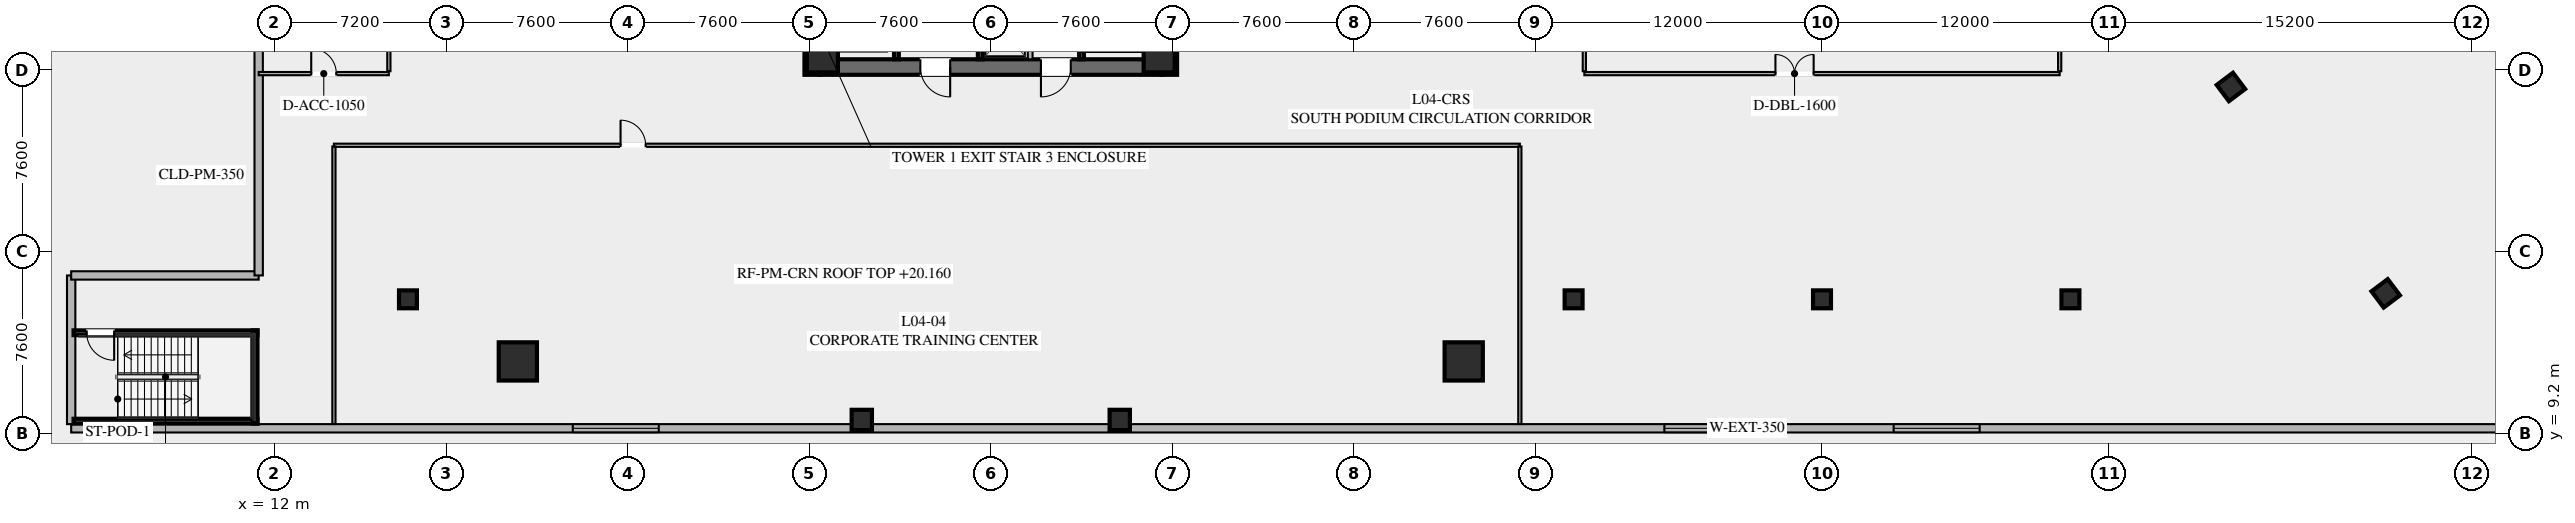
"""IFC4 building model, lengths in metres.
Left out: names, types, materials, properties, quantities, classifications, styles, units other than length and angle.
Written with IfcOpenShell. Run it as: python <this file> out.ifc"""

import sys

from ifc_helpers import new_model, si_unit, direction, frame, frame_2d, origin, origin_2d, place, context, subcontext, project, spatial, rectangle, hollow_rectangle, extrude, element, fill, save


model = new_model("IFC4")
c1 = context("Model", 3, precision=1e-05, world=origin(), true_north=direction((0.0, 1.0)))
c2 = subcontext(c1, "Body", "Model", "MODEL_VIEW")
j1 = project(units=[si_unit("LENGTHUNIT", "METRE"), si_unit("PLANEANGLEUNIT", "RADIAN")], contexts=[c1])
p1 = place(None, origin())
s1 = spatial("IfcSite", under=j1, at=p1, CompositionType="ELEMENT")
p2 = place(p1, origin())
s2 = spatial("IfcBuilding", under=s1, at=p2, CompositionType="ELEMENT")
p3 = place(p2, frame((0.0, 0.0, 19.8)))
s3 = spatial("IfcBuildingStorey", under=s2, at=p3, CompositionType="ELEMENT", Elevation=19.8)
for number, where, z_axis, x_axis in (
    (1, (34.525, 24.2, 0.0), (0.0, 0.0, 1.0), (0.0, 1.0, 0.0)),
    (2, (49.475, 39.8, 0.0), (0.0, 0.0, 1.0), (0.0, -1.0, 0.0)),
):
    element("IfcWall", number, at=place(p3, frame(where, z_axis=z_axis, x_axis=x_axis)), inside=s3, PredefinedType="SHEAR", context=c2, shape_type="SweptSolid", body=[
        extrude(rectangle(XDim=15.6, YDim=0.65, at=frame_2d((7.8, 0.0))), origin(), (0.0, 0.0, 1.0), 4.8),
    ])
p4 = place(p3, frame((49.15, 24.525, 0.0), z_axis=(0.0, 0.0, 1.0), x_axis=(-1.0, 0.0, 0.0)))
e3 = element("IfcWall", 3, at=p4, inside=s3, PredefinedType="SHEAR", context=c2, shape_type="SweptSolid", body=[
    extrude(rectangle(XDim=14.3, YDim=0.65, at=frame_2d((7.15, 0.0))), origin(), (0.0, 0.0, 1.0), 4.8),
])
p5 = place(p4, frame((8.85, 0.0, 0.0)))
e4 = element("IfcOpeningElement", 4, at=p5, cuts=e3, PredefinedType="OPENING", context=c2, shape_type="SweptSolid", body=[
    extrude(rectangle(XDim=1.25, YDim=2.25, at=frame_2d((0.625, 1.125))), frame((0.0, 0.335, 0.0), z_axis=(0.0, -1.0, 0.0), x_axis=(1.0, 0.0, 0.0)), (0.0, 0.0, 1.0), 0.67),
])
p6 = place(p4, frame((3.8, 0.0, 0.0)))
e5 = element("IfcOpeningElement", 5, at=p6, cuts=e3, PredefinedType="OPENING", context=c2, shape_type="SweptSolid", body=[
    extrude(rectangle(XDim=1.25, YDim=2.25, at=frame_2d((0.625, 1.125))), frame((0.0, 0.335, 0.0), z_axis=(0.0, -1.0, 0.0), x_axis=(1.0, 0.0, 0.0)), (0.0, 0.0, 1.0), 0.67),
])
for number, where, z_axis, x_axis in (
    (6, (34.95, 24.95, 0.0), (0.0, 0.0, 1.0), (1.0, 0.0, 0.0)),
    (7, (49.05, 24.95, 0.0), (0.0, 0.0, 1.0), (1.0, 0.0, 0.0)),
):
    element("IfcColumn", number, at=place(p3, frame(where, z_axis=z_axis, x_axis=x_axis)), inside=s3, PredefinedType="COLUMN", context=c2, shape_type="SweptSolid", body=[
        extrude(hollow_rectangle(XDim=1.3, YDim=1.3, WallThickness=0.05, at=origin_2d()), origin(), (0.0, 0.0, 1.0), 4.6),
    ])
for number, where, z_axis, x_axis in (
    (8, (22.2, 12.2, 0.0), (0.0, 0.0, 1.0), (1.0, 0.0, 0.0)),
    (9, (61.8, 12.2, 0.0), (0.0, 0.0, 1.0), (1.0, 0.0, 0.0)),
):
    element("IfcColumn", number, at=place(p3, frame(where, z_axis=z_axis, x_axis=x_axis)), inside=s3, PredefinedType="COLUMN", context=c2, shape_type="SweptSolid", body=[
        extrude(hollow_rectangle(XDim=1.6, YDim=1.6, WallThickness=0.06, at=origin_2d()), origin(), (0.0, 0.0, 1.0), 4.6),
    ])
for number, where, z_axis, x_axis in (
    (10, (36.6, 9.75, 0.0), (0.0, 0.0, 1.0), (1.0, 0.0, 0.0)),
    (11, (47.4, 9.75, 0.0), (0.0, 0.0, 1.0), (1.0, 0.0, 0.0)),
):
    element("IfcColumn", number, at=place(p3, frame(where, z_axis=z_axis, x_axis=x_axis)), inside=s3, PredefinedType="COLUMN", context=c2, shape_type="SweptSolid", body=[
        extrude(hollow_rectangle(XDim=0.85, YDim=0.85, WallThickness=0.035, at=origin_2d()), origin(), (0.0, 0.0, 1.0), 4.6),
    ])
p7 = place(p3, frame((112.476, 21.107, 0.0), z_axis=(0.0, 0.0, 1.0), x_axis=(-0.600005007985, 0.799996243986, 0.0)))
e12 = element("IfcWall", 12, at=p7, inside=s3, PredefinedType="SHEAR", context=c2, shape_type="SweptSolid", body=[
    extrude(rectangle(XDim=15.6, YDim=0.65, at=frame_2d((7.8, 0.0))), origin(), (0.0, 0.0, 1.0), 4.8),
])
for number, where, z_axis, x_axis in (
    (13, (93.92, 23.69, 0.0), (0.0, 0.0, 1.0), (0.8, 0.6, 0.0)),
    (14, (100.4, 15.05, 0.0), (0.0, 0.0, 1.0), (0.8, 0.6, 0.0)),
):
    element("IfcColumn", number, at=place(p3, frame(where, z_axis=z_axis, x_axis=x_axis)), inside=s3, PredefinedType="COLUMN", context=c2, shape_type="SweptSolid", body=[
        extrude(hollow_rectangle(XDim=0.85, YDim=0.85, WallThickness=0.035, at=origin_2d()), origin(), (0.0, 0.0, 1.0), 4.6),
    ])
for number, where, z_axis, x_axis in (
    (15, (17.6, 14.8, 0.0), (0.0, 0.0, 1.0), (1.0, 0.0, 0.0)),
    (16, (66.4, 14.8, 0.0), (0.0, 0.0, 1.0), (1.0, 0.0, 0.0)),
    (17, (76.8, 14.8, 0.0), (0.0, 0.0, 1.0), (1.0, 0.0, 0.0)),
    (18, (87.2, 14.8, 0.0), (0.0, 0.0, 1.0), (1.0, 0.0, 0.0)),
):
    element("IfcColumn", number, at=place(p3, frame(where, z_axis=z_axis, x_axis=x_axis)), inside=s3, PredefinedType="COLUMN", context=c2, shape_type="SweptSolid", body=[
        extrude(rectangle(XDim=0.75, YDim=0.75, at=origin_2d()), origin(), (0.0, 0.0, 1.0), 4.6),
    ])
p8 = place(p3, frame((143.825, 9.4, 0.0), z_axis=(0.0, 0.0, 1.0), x_axis=(-1.0, 0.0, 0.0)))
e19 = element("IfcWall", 19, at=p8, inside=s3, PredefinedType="SOLIDWALL", context=c2, shape_type="SweptSolid", body=[
    extrude(rectangle(XDim=140.325, YDim=0.35, at=frame_2d((70.163, 0.0))), origin(), (0.0, 0.0, 1.0), 4.6),
])
p9 = place(p8, frame((115.725, 0.0, 0.95)))
e20 = element("IfcOpeningElement", 20, at=p9, cuts=e19, PredefinedType="OPENING", context=c2, shape_type="SweptSolid", body=[
    extrude(rectangle(XDim=3.6, YDim=1.8, at=frame_2d((1.8, 0.9))), frame((0.0, 0.185, 0.0), z_axis=(0.0, -1.0, 0.0), x_axis=(1.0, 0.0, 0.0)), (0.0, 0.0, 1.0), 0.37),
])
p10 = place(p8, frame((70.025, 0.0, 0.95)))
e21 = element("IfcOpeningElement", 21, at=p10, cuts=e19, PredefinedType="OPENING", context=c2, shape_type="SweptSolid", body=[
    extrude(rectangle(XDim=3.6, YDim=1.8, at=frame_2d((1.8, 0.9))), frame((0.0, 0.185, 0.0), z_axis=(0.0, -1.0, 0.0), x_axis=(1.0, 0.0, 0.0)), (0.0, 0.0, 1.0), 0.37),
])
p11 = place(p8, frame((60.425, 0.0, 0.95)))
e22 = element("IfcOpeningElement", 22, at=p11, cuts=e19, PredefinedType="OPENING", context=c2, shape_type="SweptSolid", body=[
    extrude(rectangle(XDim=3.6, YDim=1.8, at=frame_2d((1.8, 0.9))), frame((0.0, 0.185, 0.0), z_axis=(0.0, -1.0, 0.0), x_axis=(1.0, 0.0, 0.0)), (0.0, 0.0, 1.0), 0.37),
])
p12 = place(p3, frame((3.5, 9.575, 0.0), z_axis=(0.0, 0.0, 1.0), x_axis=(0.0, 1.0, 0.0)))
e23 = element("IfcWall", 23, at=p12, inside=s3, PredefinedType="SOLIDWALL", context=c2, shape_type="SweptSolid", body=[
    extrude(rectangle(XDim=6.225, YDim=0.35, at=frame_2d((3.113, 0.0))), origin(), (0.0, 0.0, 1.0), 4.6),
])
p13 = place(p3, frame((3.5, 15.8, 0.0), z_axis=(0.0, 0.0, 1.0), x_axis=(1.0, 0.0, 0.0)))
e24 = element("IfcWall", 24, at=p13, inside=s3, PredefinedType="SOLIDWALL", context=c2, shape_type="SweptSolid", body=[
    extrude(rectangle(XDim=7.85, YDim=0.35, at=frame_2d((3.925, 0.0))), origin(), (0.0, 0.0, 1.0), 4.6),
])
p14 = place(p3, frame((11.35, 15.8, 0.0), z_axis=(0.0, 0.0, 1.0), x_axis=(0.0, 1.0, 0.0)))
e25 = element("IfcWall", 25, at=p14, inside=s3, PredefinedType="SOLIDWALL", context=c2, shape_type="SweptSolid", body=[
    extrude(rectangle(XDim=39.625, YDim=0.35, at=frame_2d((19.812, 0.0))), origin(), (0.0, 0.0, 1.0), 4.6),
])
p15 = place(p14, frame((15.7, 0.0, 0.0)))
e26 = element("IfcOpeningElement", 26, at=p15, cuts=e25, PredefinedType="OPENING", context=c2, shape_type="SweptSolid", body=[
    extrude(rectangle(XDim=1.65, YDim=2.2, at=frame_2d((0.825, 1.1))), frame((0.0, 0.185, 0.0), z_axis=(0.0, -1.0, 0.0), x_axis=(1.0, 0.0, 0.0)), (0.0, 0.0, 1.0), 0.37),
])
p16 = place(p3, frame((45.8, 32.8, 0.0), z_axis=(0.0, 0.0, 1.0), x_axis=(0.0, -1.0, 0.0)))
e27 = element("IfcWall", 27, at=p16, inside=s3, PredefinedType="SHEAR", context=c2, shape_type="SweptSolid", body=[
    extrude(rectangle(XDim=7.95, YDim=0.2, at=frame_2d((3.975, 0.0))), origin(), (0.0, 0.0, 1.0), 4.6),
])
p17 = place(p16, frame((0.45, 0.0, 0.0)))
e28 = element("IfcOpeningElement", 28, at=p17, cuts=e27, PredefinedType="OPENING", context=c2, shape_type="SweptSolid", body=[
    extrude(rectangle(XDim=1.15, YDim=2.2, at=frame_2d((0.575, 1.1))), frame((0.0, 0.11, 0.0), z_axis=(0.0, -1.0, 0.0), x_axis=(1.0, 0.0, 0.0)), (0.0, 0.0, 1.0), 0.22),
])
p18 = place(p3, frame((41.56, 24.85, 0.0), z_axis=(0.0, 0.0, 1.0), x_axis=(0.0, 1.0, 0.0)))
e29 = element("IfcWall", 29, at=p18, inside=s3, PredefinedType="SHEAR", context=c2, shape_type="SweptSolid", body=[
    extrude(rectangle(XDim=14.3, YDim=0.2, at=frame_2d((7.15, 0.0))), origin(), (0.0, 0.0, 1.0), 4.6),
])
p19 = place(p3, frame((38.05, 24.85, 0.0), z_axis=(0.0, 0.0, 1.0), x_axis=(0.0, 1.0, 0.0)))
e30 = element("IfcWall", 30, at=p19, inside=s3, PredefinedType="SHEAR", context=c2, shape_type="SweptSolid", body=[
    extrude(rectangle(XDim=6.35, YDim=0.2, at=frame_2d((3.175, 0.0))), origin(), (0.0, 0.0, 1.0), 4.6),
])
p20 = place(p19, frame((4.775, 0.0, 0.0)))
e31 = element("IfcOpeningElement", 31, at=p20, cuts=e30, PredefinedType="OPENING", context=c2, shape_type="SweptSolid", body=[
    extrude(rectangle(XDim=1.3, YDim=2.25, at=frame_2d((0.65, 1.125))), frame((0.0, 0.11, 0.0), z_axis=(0.0, -1.0, 0.0), x_axis=(1.0, 0.0, 0.0)), (0.0, 0.0, 1.0), 0.22),
])
p21 = place(p19, frame((2.775, 0.0, 0.0)))
e32 = element("IfcOpeningElement", 32, at=p21, cuts=e30, PredefinedType="OPENING", context=c2, shape_type="SweptSolid", body=[
    extrude(rectangle(XDim=1.3, YDim=2.25, at=frame_2d((0.65, 1.125))), frame((0.0, 0.11, 0.0), z_axis=(0.0, -1.0, 0.0), x_axis=(1.0, 0.0, 0.0)), (0.0, 0.0, 1.0), 0.22),
])
p22 = place(p19, frame((0.575, 0.0, 0.0)))
e33 = element("IfcOpeningElement", 33, at=p22, cuts=e30, PredefinedType="OPENING", context=c2, shape_type="SweptSolid", body=[
    extrude(rectangle(XDim=1.3, YDim=2.25, at=frame_2d((0.65, 1.125))), frame((0.0, 0.11, 0.0), z_axis=(0.0, -1.0, 0.0), x_axis=(1.0, 0.0, 0.0)), (0.0, 0.0, 1.0), 0.22),
])
p23 = place(p3, frame((43.65, 24.85, 0.0), z_axis=(0.0, 0.0, 1.0), x_axis=(0.0, 1.0, 0.0)))
e34 = element("IfcWall", 34, at=p23, inside=s3, PredefinedType="SOLIDWALL", context=c2, shape_type="SweptSolid", body=[
    extrude(rectangle(XDim=6.8, YDim=0.2, at=frame_2d((3.4, 0.0))), origin(), (0.0, 0.0, 1.0), 4.6),
])
p24 = place(p23, frame((0.625, 0.0, 0.0)))
e35 = element("IfcOpeningElement", 35, at=p24, cuts=e34, PredefinedType="OPENING", context=c2, shape_type="SweptSolid", body=[
    extrude(rectangle(XDim=1.1, YDim=2.2, at=frame_2d((0.55, 1.1))), frame((0.0, 0.11, 0.0), z_axis=(0.0, -1.0, 0.0), x_axis=(1.0, 0.0, 0.0)), (0.0, 0.0, 1.0), 0.22),
])
p25 = place(p23, frame((2.875, 0.0, 0.0)))
e36 = element("IfcOpeningElement", 36, at=p25, cuts=e34, PredefinedType="OPENING", context=c2, shape_type="SweptSolid", body=[
    extrude(rectangle(XDim=1.1, YDim=2.2, at=frame_2d((0.55, 1.1))), frame((0.0, 0.11, 0.0), z_axis=(0.0, -1.0, 0.0), x_axis=(1.0, 0.0, 0.0)), (0.0, 0.0, 1.0), 0.22),
])
p26 = place(p23, frame((5.125, 0.0, 0.0)))
e37 = element("IfcOpeningElement", 37, at=p26, cuts=e34, PredefinedType="OPENING", context=c2, shape_type="SweptSolid", body=[
    extrude(rectangle(XDim=1.1, YDim=2.2, at=frame_2d((0.55, 1.1))), frame((0.0, 0.11, 0.0), z_axis=(0.0, -1.0, 0.0), x_axis=(1.0, 0.0, 0.0)), (0.0, 0.0, 1.0), 0.22),
])
p27 = place(p3, frame((11.3, 13.4, 0.0), z_axis=(0.0, 0.0, 1.0), x_axis=(-1.0, 0.0, 0.0)))
e38 = element("IfcWall", 38, at=p27, inside=s3, PredefinedType="SHEAR", context=c2, shape_type="SweptSolid", body=[
    extrude(rectangle(XDim=7.7, YDim=0.2, at=frame_2d((3.85, 0.0))), origin(), (0.0, 0.0, 1.0), 4.6),
])
p28 = place(p27, frame((6.0, 0.0, 0.0)))
e39 = element("IfcOpeningElement", 39, at=p28, cuts=e38, PredefinedType="OPENING", context=c2, shape_type="SweptSolid", body=[
    extrude(rectangle(XDim=1.15, YDim=2.2, at=frame_2d((0.575, 1.1))), frame((0.0, 0.11, 0.0), z_axis=(0.0, -1.0, 0.0), x_axis=(1.0, 0.0, 0.0)), (0.0, 0.0, 1.0), 0.22),
])
p29 = place(p3, frame((3.6, 9.7, 0.0), z_axis=(0.0, 0.0, 1.0), x_axis=(1.0, 0.0, 0.0)))
e40 = element("IfcWall", 40, at=p29, inside=s3, PredefinedType="SHEAR", context=c2, shape_type="SweptSolid", body=[
    extrude(rectangle(XDim=7.7, YDim=0.2, at=frame_2d((3.85, 0.0))), origin(), (0.0, 0.0, 1.0), 4.6),
])
p30 = place(p3, frame((11.2, 9.6, 0.0), z_axis=(0.0, 0.0, 1.0), x_axis=(0.0, 1.0, 0.0)))
e41 = element("IfcWall", 41, at=p30, inside=s3, PredefinedType="SHEAR", context=c2, shape_type="SweptSolid", body=[
    extrude(rectangle(XDim=3.9, YDim=0.2, at=frame_2d((1.95, 0.0))), origin(), (0.0, 0.0, 1.0), 4.6),
])
p31 = place(p3, frame((11.35, 24.25, 0.0), z_axis=(0.0, 0.0, 1.0), x_axis=(1.0, 0.0, 0.0)))
e42 = element("IfcWall", 42, at=p31, inside=s3, PredefinedType="PARTITIONING", context=c2, shape_type="SweptSolid", body=[
    extrude(rectangle(XDim=5.45, YDim=0.135, at=frame_2d((2.725, 0.0))), origin(), (0.0, 0.0, 1.0), 3.643),
])
p32 = place(p31, frame((2.2, 0.0, 0.0)))
e43 = element("IfcOpeningElement", 43, at=p32, cuts=e42, PredefinedType="OPENING", context=c2, shape_type="SweptSolid", body=[
    extrude(rectangle(XDim=1.05, YDim=2.2, at=frame_2d((0.525, 1.1))), frame((0.0, 0.077, 0.0), z_axis=(0.0, -1.0, 0.0), x_axis=(1.0, 0.0, 0.0)), (0.0, 0.0, 1.0), 0.155),
])
p33 = place(p3, frame((16.8, 24.35, 0.0), z_axis=(0.0, 0.0, 1.0), x_axis=(0.0, 1.0, 0.0)))
e44 = element("IfcWall", 44, at=p33, inside=s3, PredefinedType="PARTITIONING", context=c2, shape_type="SweptSolid", body=[
    extrude(rectangle(XDim=15.4, YDim=0.135, at=frame_2d((7.7, 0.0))), origin(), (0.0, 0.0, 1.0), 3.643),
])
p34 = place(p3, frame((66.85, 24.25, 0.0), z_axis=(0.0, 0.0, 1.0), x_axis=(1.0, 0.0, 0.0)))
e45 = element("IfcWall", 45, at=p34, inside=s3, PredefinedType="PARTITIONING", context=c2, shape_type="SweptSolid", body=[
    extrude(rectangle(XDim=19.9, YDim=0.135, at=frame_2d((9.95, 0.0))), origin(), (0.0, 0.0, 1.0), 3.643),
])
p35 = place(p34, frame((8.0, 0.0, 0.0)))
e46 = element("IfcOpeningElement", 46, at=p35, cuts=e45, PredefinedType="OPENING", context=c2, shape_type="SweptSolid", body=[
    extrude(rectangle(XDim=1.6, YDim=2.25, at=frame_2d((0.8, 1.125))), frame((0.0, 0.077, 0.0), z_axis=(0.0, -1.0, 0.0), x_axis=(1.0, 0.0, 0.0)), (0.0, 0.0, 1.0), 0.155),
])
for number, where, z_axis, x_axis in (
    (47, (66.85, 24.35, 0.0), (0.0, 0.0, 1.0), (0.0, 1.0, 0.0)),
    (48, (86.75, 24.35, 0.0), (0.0, 0.0, 1.0), (0.0, 1.0, 0.0)),
):
    element("IfcWall", number, at=place(p3, frame(where, z_axis=z_axis, x_axis=x_axis)), inside=s3, PredefinedType="PARTITIONING", context=c2, shape_type="SweptSolid", body=[
        extrude(rectangle(XDim=15.3, YDim=0.135, at=frame_2d((7.65, 0.0))), origin(), (0.0, 0.0, 1.0), 3.643),
    ])
p36 = place(p3, frame((14.5, 21.25, 0.0), z_axis=(0.0, 0.0, 1.0), x_axis=(1.0, 0.0, 0.0)))
e49 = element("IfcWall", 49, at=p36, inside=s3, PredefinedType="PARTITIONING", context=c2, shape_type="SweptSolid", body=[
    extrude(rectangle(XDim=49.65, YDim=0.135, at=frame_2d((24.825, 0.0))), origin(), (0.0, 0.0, 1.0), 3.643),
])
p37 = place(p36, frame((12.0, 0.0, 0.0)))
e50 = element("IfcOpeningElement", 50, at=p37, cuts=e49, PredefinedType="OPENING", context=c2, shape_type="SweptSolid", body=[
    extrude(rectangle(XDim=1.05, YDim=2.2, at=frame_2d((0.525, 1.1))), frame((0.0, 0.077, 0.0), z_axis=(0.0, -1.0, 0.0), x_axis=(1.0, 0.0, 0.0)), (0.0, 0.0, 1.0), 0.155),
])
for number, where, z_axis, x_axis in (
    (51, (14.5, 9.58, 0.0), (0.0, 0.0, 1.0), (0.0, 1.0, 0.0)),
    (52, (64.15, 9.58, 0.0), (0.0, 0.0, 1.0), (0.0, 1.0, 0.0)),
):
    element("IfcWall", number, at=place(p3, frame(where, z_axis=z_axis, x_axis=x_axis)), inside=s3, PredefinedType="PARTITIONING", context=c2, shape_type="SweptSolid", body=[
        extrude(rectangle(XDim=11.62, YDim=0.135, at=frame_2d((5.81, 0.0))), origin(), (0.0, 0.0, 1.0), 3.643),
    ])
p38 = place(p9, origin())
e53 = element("IfcWindow", 53, at=p38, inside=s3, PartitioningType="SINGLE_PANEL", PredefinedType="WINDOW", context=c2, shape_type="SweptSolid", body=[
    extrude(rectangle(XDim=3.6, YDim=1.8, at=frame_2d((1.8, 0.9))), frame((0.0, 0.03, 0.0), z_axis=(0.0, -1.0, 0.0), x_axis=(1.0, 0.0, 0.0)), (0.0, 0.0, 1.0), 0.06),
])
fill(e20, e53)
p39 = place(p10, origin())
e54 = element("IfcWindow", 54, at=p39, inside=s3, PartitioningType="SINGLE_PANEL", PredefinedType="WINDOW", context=c2, shape_type="SweptSolid", body=[
    extrude(rectangle(XDim=3.6, YDim=1.8, at=frame_2d((1.8, 0.9))), frame((0.0, 0.03, 0.0), z_axis=(0.0, -1.0, 0.0), x_axis=(1.0, 0.0, 0.0)), (0.0, 0.0, 1.0), 0.06),
])
fill(e21, e54)
p40 = place(p11, origin())
e55 = element("IfcWindow", 55, at=p40, inside=s3, PartitioningType="SINGLE_PANEL", PredefinedType="WINDOW", context=c2, shape_type="SweptSolid", body=[
    extrude(rectangle(XDim=3.6, YDim=1.8, at=frame_2d((1.8, 0.9))), frame((0.0, 0.03, 0.0), z_axis=(0.0, -1.0, 0.0), x_axis=(1.0, 0.0, 0.0)), (0.0, 0.0, 1.0), 0.06),
])
fill(e22, e55)
p41 = place(p5, origin())
e56 = element("IfcDoor", 56, at=p41, inside=s3, OperationType="SINGLE_SWING_LEFT", PredefinedType="DOOR", context=c2, shape_type="SweptSolid", body=[
    extrude(rectangle(XDim=1.25, YDim=2.25, at=frame_2d((0.625, 1.125))), frame((0.0, 0.025, 0.0), z_axis=(0.0, -1.0, 0.0), x_axis=(1.0, 0.0, 0.0)), (0.0, 0.0, 1.0), 0.05),
])
fill(e4, e56)
p42 = place(p6, origin())
e57 = element("IfcDoor", 57, at=p42, inside=s3, OperationType="SINGLE_SWING_RIGHT", PredefinedType="DOOR", context=c2, shape_type="SweptSolid", body=[
    extrude(rectangle(XDim=1.25, YDim=2.25, at=frame_2d((0.625, 1.125))), frame((0.0, 0.025, 0.0), z_axis=(0.0, -1.0, 0.0), x_axis=(1.0, 0.0, 0.0)), (0.0, 0.0, 1.0), 0.05),
])
fill(e5, e57)
p43 = place(p28, origin())
e58 = element("IfcDoor", 58, at=p43, inside=s3, OperationType="SINGLE_SWING_LEFT", PredefinedType="DOOR", context=c2, shape_type="SweptSolid", body=[
    extrude(rectangle(XDim=1.15, YDim=2.2, at=frame_2d((0.575, 1.1))), frame((0.0, 0.025, 0.0), z_axis=(0.0, -1.0, 0.0), x_axis=(1.0, 0.0, 0.0)), (0.0, 0.0, 1.0), 0.05),
])
fill(e39, e58)
p44 = place(p32, origin())
e59 = element("IfcDoor", 59, at=p44, inside=s3, OperationType="SINGLE_SWING_LEFT", PredefinedType="DOOR", context=c2, shape_type="SweptSolid", body=[
    extrude(rectangle(XDim=1.05, YDim=2.2, at=frame_2d((0.525, 1.1))), frame((0.0, 0.025, 0.0), z_axis=(0.0, -1.0, 0.0), x_axis=(1.0, 0.0, 0.0)), (0.0, 0.0, 1.0), 0.05),
])
fill(e43, e59)
p45 = place(p35, origin())
e60 = element("IfcDoor", 60, at=p45, inside=s3, OperationType="DOUBLE_DOOR_SINGLE_SWING", PredefinedType="DOOR", context=c2, shape_type="SweptSolid", body=[
    extrude(rectangle(XDim=1.6, YDim=2.25, at=frame_2d((0.8, 1.125))), frame((0.0, 0.025, 0.0), z_axis=(0.0, -1.0, 0.0), x_axis=(1.0, 0.0, 0.0)), (0.0, 0.0, 1.0), 0.05),
])
fill(e46, e60)
p46 = place(p37, origin())
e61 = element("IfcDoor", 61, at=p46, inside=s3, OperationType="SINGLE_SWING_LEFT", PredefinedType="DOOR", context=c2, shape_type="SweptSolid", body=[
    extrude(rectangle(XDim=1.05, YDim=2.2, at=frame_2d((0.525, 1.1))), frame((0.0, 0.025, 0.0), z_axis=(0.0, -1.0, 0.0), x_axis=(1.0, 0.0, 0.0)), (0.0, 0.0, 1.0), 0.05),
])
fill(e50, e61)
save(model, sys.argv[1])
